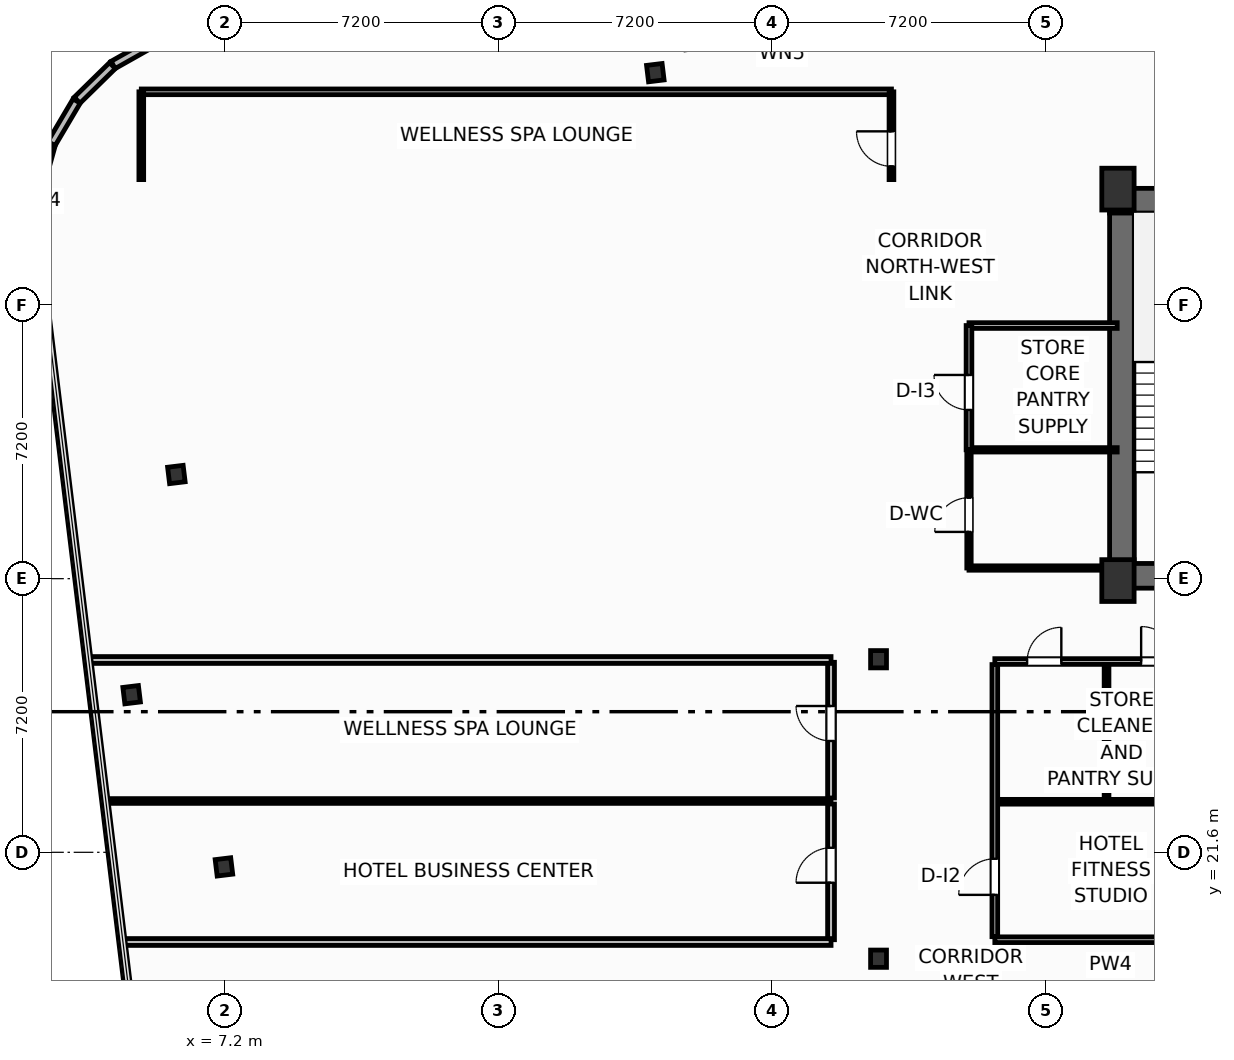
"""IFC4 building model, lengths in metres.
Left out: names, types, materials, properties, quantities, classifications, styles, units other than length and angle.
Written with IfcOpenShell. Run it as: python <this file> out.ifc"""

import sys

from ifc_helpers import new_model, si_unit, direction, frame, frame_2d, origin, origin_2d, place, context, subcontext, project, spatial, rectangle, i_section, extrude, element, fill, save


model = new_model("IFC4")
c1 = context("Model", 3, precision=1e-05, world=origin(), true_north=direction((0.0, 1.0)))
c2 = subcontext(c1, "Body", "Model", "MODEL_VIEW")
j1 = project(units=[si_unit("LENGTHUNIT", "METRE"), si_unit("PLANEANGLEUNIT", "RADIAN")], contexts=[c1])
p1 = place(None, origin())
s1 = spatial("IfcSite", under=j1, at=p1, CompositionType="ELEMENT")
p2 = place(p1, origin())
s2 = spatial("IfcBuilding", under=s1, at=p2, CompositionType="ELEMENT")
p3 = place(p2, frame((0.0, 0.0, 204.2)))
s3 = spatial("IfcBuildingStorey", under=s2, at=p3, CompositionType="ELEMENT", Elevation=204.2)
for number, where, z_axis, x_axis in (
    (1, (30.7, 28.75, 0.0), (0.0, 0.0, 1.0), (1.0, 0.0, 0.0)),
    (2, (30.7, 39.05, 0.0), (0.0, 0.0, 1.0), (1.0, 0.0, 0.0)),
):
    element("IfcColumn", number, at=place(p3, frame(where, z_axis=z_axis, x_axis=x_axis)), inside=s3, PredefinedType="COLUMN", context=c2, shape_type="SweptSolid", body=[
        extrude(rectangle(XDim=0.85, YDim=1.1, at=origin_2d()), origin(), (0.0, 0.0, 1.0), 3.7),
    ])
for number, where, z_axis, x_axis in (
    (3, (24.4, 18.8, 0.0), (0.0, 0.0, 1.0), (1.0, 0.0, 0.0)),
    (4, (24.4, 26.68, 0.0), (0.0, 0.0, 1.0), (1.0, 0.0, 0.0)),
):
    element("IfcColumn", number, at=place(p3, frame(where, z_axis=z_axis, x_axis=x_axis)), inside=s3, PredefinedType="COLUMN", context=c2, shape_type="SweptSolid", body=[
        extrude(i_section(OverallWidth=0.418, OverallDepth=0.455, WebThickness=0.042, FlangeThickness=0.068, FilletRadius=0.025, at=origin_2d()), origin(), (0.0, 0.0, 1.0), 3.7),
    ])
p4 = place(p3, frame((30.48, 38.745, 0.0), z_axis=(0.0, 0.0, 1.0), x_axis=(1.0, 0.0, 0.0)))
e5 = element("IfcWall", 5, at=p4, inside=s3, PredefinedType="SHEAR", context=c2, shape_type="SweptSolid", body=[
    extrude(rectangle(XDim=17.44, YDim=0.65, at=frame_2d((8.72, 0.0))), origin(), (0.0, 0.0, 1.0), 3.38),
])
p5 = place(p3, frame((30.805, 29.2, 0.0), z_axis=(0.0, 0.0, 1.0), x_axis=(0.0, 1.0, 0.0)))
e6 = element("IfcWall", 6, at=p5, inside=s3, PredefinedType="SHEAR", context=c2, shape_type="SweptSolid", body=[
    extrude(rectangle(XDim=9.22, YDim=0.65, at=frame_2d((4.61, 0.0))), origin(), (0.0, 0.0, 1.0), 3.38),
])
p6 = place(p3, frame((30.48, 28.875, 0.0), z_axis=(0.0, 0.0, 1.0), x_axis=(1.0, 0.0, 0.0)))
e7 = element("IfcWall", 7, at=p6, inside=s3, PredefinedType="SHEAR", context=c2, shape_type="SweptSolid", body=[
    extrude(rectangle(XDim=4.32, YDim=0.65, at=frame_2d((2.16, 0.0))), origin(), (0.0, 0.0, 1.0), 3.38),
])
for number, where, z_axis, x_axis in (
    (8, (18.526, 42.114, 0.0), (0.0, 0.0, 1.0), (0.993, 0.12, 0.0)),
    (9, (5.923, 31.541, 0.0), (0.0, 0.0, 1.0), (0.993, 0.12, 0.0)),
    (10, (4.746, 25.747, 0.0), (0.0, 0.0, 1.0), (0.993, 0.12, 0.0)),
    (11, (7.175, 21.216, 0.0), (0.0, 0.0, 1.0), (0.993, 0.12, 0.0)),
):
    element("IfcColumn", number, at=place(p3, frame(where, z_axis=z_axis, x_axis=x_axis)), inside=s3, PredefinedType="COLUMN", context=c2, shape_type="SweptSolid", body=[
        extrude(i_section(OverallWidth=0.412, OverallDepth=0.435, WebThickness=0.036, FlangeThickness=0.057, FilletRadius=0.025, at=origin_2d()), origin(), (0.0, 0.0, 1.0), 3.7),
    ])
for number, where, z_axis, x_axis in (
    (12, (5.392, 42.956, 0.0), (0.0, 0.0, 1.0), (-0.871, -0.491, 0.0)),
    (13, (4.241, 42.3, 0.0), (0.0, 0.0, 1.0), (-0.714, -0.7, 0.0)),
):
    element("IfcWall", number, at=place(p3, frame(where, z_axis=z_axis, x_axis=x_axis)), inside=s3, PredefinedType="SOLIDWALL", context=c2, shape_type="SweptSolid", body=[
        extrude(rectangle(XDim=1.301, YDim=0.22, at=frame_2d((0.65, 0.0))), origin(), (0.0, 0.0, 1.0), 2.66),
    ])
p7 = place(p3, frame((3.299, 41.368, 0.0), z_axis=(0.0, 0.0, 1.0), x_axis=(-0.508716668029, -0.860933999601, 0.0)))
e14 = element("IfcWall", 14, at=p7, inside=s3, PredefinedType="SOLIDWALL", context=c2, shape_type="SweptSolid", body=[
    extrude(rectangle(XDim=1.301, YDim=0.22, at=frame_2d((0.65, 0.0))), origin(), (0.0, 0.0, 1.0), 2.66),
])
p8 = place(p3, frame((2.63, 40.224, 0.0), z_axis=(0.0, 0.0, 1.0), x_axis=(-0.26876657226, -0.963205341366, 0.0)))
e15 = element("IfcWall", 15, at=p8, inside=s3, PredefinedType="SOLIDWALL", context=c2, shape_type="SweptSolid", body=[
    extrude(rectangle(XDim=1.301, YDim=0.22, at=frame_2d((0.65, 0.0))), origin(), (0.0, 0.0, 1.0), 2.66),
])
p9 = place(p3, frame((5.0, 41.61, 0.0), z_axis=(0.0, 0.0, 1.0), x_axis=(1.0, 0.0, 0.0)))
e16 = element("IfcWall", 16, at=p9, inside=s3, PredefinedType="PARTITIONING", context=c2, shape_type="SweptSolid", body=[
    extrude(rectangle(XDim=19.74, YDim=0.15, at=frame_2d((9.87, 0.0))), origin(), (0.0, 0.0, 1.0), 3.38),
])
p10 = place(p3, frame((5.0, 39.3, 0.0), z_axis=(0.0, 0.0, 1.0), x_axis=(0.0, 1.0, 0.0)))
e17 = element("IfcWall", 17, at=p10, inside=s3, PredefinedType="PARTITIONING", context=c2, shape_type="SweptSolid", body=[
    extrude(rectangle(XDim=2.31, YDim=0.125, at=frame_2d((1.155, 0.0))), origin(), (0.0, 0.0, 1.0), 3.38),
])
p11 = place(p3, frame((24.74, 39.3, 0.0), z_axis=(0.0, 0.0, 1.0), x_axis=(0.0, 1.0, 0.0)))
e18 = element("IfcWall", 18, at=p11, inside=s3, PredefinedType="PARTITIONING", context=c2, shape_type="SweptSolid", body=[
    extrude(rectangle(XDim=2.31, YDim=0.125, at=frame_2d((1.155, 0.0))), origin(), (0.0, 0.0, 1.0), 3.38),
])
p12 = place(p11, frame((0.35, 0.0, 0.0)))
e19 = element("IfcOpeningElement", 19, at=p12, cuts=e18, PredefinedType="OPENING", context=c2, shape_type="SweptSolid", body=[
    extrude(rectangle(XDim=0.92, YDim=2.05, at=frame_2d((0.46, 1.025))), frame((0.0, 0.073, 0.0), z_axis=(0.0, -1.0, 0.0), x_axis=(1.0, 0.0, 0.0)), (0.0, 0.0, 1.0), 0.145),
])
p13 = place(p3, frame((23.15, 19.3, 0.0), z_axis=(0.0, 0.0, 1.0), x_axis=(0.0, 1.0, 0.0)))
e20 = element("IfcWall", 20, at=p13, inside=s3, PredefinedType="PARTITIONING", context=c2, shape_type="SweptSolid", body=[
    extrude(rectangle(XDim=3.57, YDim=0.18, at=frame_2d((1.785, 0.0))), origin(), (0.0, 0.0, 1.0), 3.38),
])
p14 = place(p13, frame((1.5, 0.0, 0.0)))
e21 = element("IfcOpeningElement", 21, at=p14, cuts=e20, PredefinedType="OPENING", context=c2, shape_type="SweptSolid", body=[
    extrude(rectangle(XDim=0.92, YDim=2.05, at=frame_2d((0.46, 1.025))), frame((0.0, 0.1, 0.0), z_axis=(0.0, -1.0, 0.0), x_axis=(1.0, 0.0, 0.0)), (0.0, 0.0, 1.0), 0.2),
])
p15 = place(p3, frame((23.15, 23.03, 0.0), z_axis=(0.0, 0.0, 1.0), x_axis=(0.0, 1.0, 0.0)))
e22 = element("IfcWall", 22, at=p15, inside=s3, PredefinedType="PARTITIONING", context=c2, shape_type="SweptSolid", body=[
    extrude(rectangle(XDim=3.57, YDim=0.18, at=frame_2d((1.785, 0.0))), origin(), (0.0, 0.0, 1.0), 3.38),
])
p16 = place(p15, frame((1.5, 0.0, 0.0)))
e23 = element("IfcOpeningElement", 23, at=p16, cuts=e22, PredefinedType="OPENING", context=c2, shape_type="SweptSolid", body=[
    extrude(rectangle(XDim=0.92, YDim=2.05, at=frame_2d((0.46, 1.025))), frame((0.0, 0.1, 0.0), z_axis=(0.0, -1.0, 0.0), x_axis=(1.0, 0.0, 0.0)), (0.0, 0.0, 1.0), 0.2),
])
p17 = place(p3, frame((4.107, 22.95, 0.0), z_axis=(0.0, 0.0, 1.0), x_axis=(1.0, 0.0, 0.0)))
e24 = element("IfcWall", 24, at=p17, inside=s3, PredefinedType="PARTITIONING", context=c2, shape_type="SweptSolid", body=[
    extrude(rectangle(XDim=19.042, YDim=0.125, at=frame_2d((9.521, 0.0))), origin(), (0.0, 0.0, 1.0), 1.165),
])
p18 = place(p3, frame((4.557, 19.24, 0.0), z_axis=(0.0, 0.0, 1.0), x_axis=(1.0, 0.0, 0.0)))
e25 = element("IfcWall", 25, at=p18, inside=s3, PredefinedType="PARTITIONING", context=c2, shape_type="SweptSolid", body=[
    extrude(rectangle(XDim=18.593, YDim=0.18, at=frame_2d((9.296, 0.0))), origin(), (0.0, 0.0, 1.0), 3.38),
])
p19 = place(p3, frame((3.658, 26.66, 0.0), z_axis=(0.0, 0.0, 1.0), x_axis=(1.0, 0.0, 0.0)))
e26 = element("IfcWall", 26, at=p19, inside=s3, PredefinedType="PARTITIONING", context=c2, shape_type="SweptSolid", body=[
    extrude(rectangle(XDim=19.492, YDim=0.18, at=frame_2d((9.746, 0.0))), origin(), (0.0, 0.0, 1.0), 1.165),
])
p20 = place(p3, frame((27.46, 19.3, 0.0), z_axis=(0.0, 0.0, 1.0), x_axis=(1.0, 0.0, 0.0)))
e27 = element("IfcWall", 27, at=p20, inside=s3, PredefinedType="PARTITIONING", context=c2, shape_type="SweptSolid", body=[
    extrude(rectangle(XDim=6.1, YDim=0.15, at=frame_2d((3.05, 0.0))), origin(), (0.0, 0.0, 1.0), 2.592),
])
p21 = place(p3, frame((27.46, 26.62, 0.0), z_axis=(0.0, 0.0, 1.0), x_axis=(1.0, 0.0, 0.0)))
e28 = element("IfcWall", 28, at=p21, inside=s3, PredefinedType="PARTITIONING", context=c2, shape_type="SweptSolid", body=[
    extrude(rectangle(XDim=6.1, YDim=0.15, at=frame_2d((3.05, 0.0))), origin(), (0.0, 0.0, 1.0), 2.592),
])
p22 = place(p21, frame((0.85, 0.0, 0.0)))
e29 = element("IfcOpeningElement", 29, at=p22, cuts=e28, PredefinedType="OPENING", context=c2, shape_type="SweptSolid", body=[
    extrude(rectangle(XDim=0.9, YDim=2.05, at=frame_2d((0.45, 1.025))), frame((0.0, 0.085, 0.0), z_axis=(0.0, -1.0, 0.0), x_axis=(1.0, 0.0, 0.0)), (0.0, 0.0, 1.0), 0.17),
])
p23 = place(p21, frame((3.85, 0.0, 0.0)))
e30 = element("IfcOpeningElement", 30, at=p23, cuts=e28, PredefinedType="OPENING", context=c2, shape_type="SweptSolid", body=[
    extrude(rectangle(XDim=0.92, YDim=2.05, at=frame_2d((0.46, 1.025))), frame((0.0, 0.085, 0.0), z_axis=(0.0, -1.0, 0.0), x_axis=(1.0, 0.0, 0.0)), (0.0, 0.0, 1.0), 0.17),
])
p24 = place(p3, frame((27.52, 22.93, 0.0), z_axis=(0.0, 0.0, 1.0), x_axis=(1.0, 0.0, 0.0)))
e31 = element("IfcWall", 31, at=p24, inside=s3, PredefinedType="PARTITIONING", context=c2, shape_type="SweptSolid", body=[
    extrude(rectangle(XDim=6.0, YDim=0.125, at=frame_2d((3.0, 0.0))), origin(), (0.0, 0.0, 1.0), 3.38),
])
p25 = place(p3, frame((30.4, 23.0, 0.0), z_axis=(0.0, 0.0, 1.0), x_axis=(0.0, 1.0, 0.0)))
e32 = element("IfcWall", 32, at=p25, inside=s3, PredefinedType="PARTITIONING", context=c2, shape_type="SweptSolid", body=[
    extrude(rectangle(XDim=3.54, YDim=0.125, at=frame_2d((1.77, 0.0))), origin(), (0.0, 0.0, 1.0), 3.38),
])
p26 = place(p3, frame((27.46, 19.38, 0.0), z_axis=(0.0, 0.0, 1.0), x_axis=(0.0, 1.0, 0.0)))
e33 = element("IfcWall", 33, at=p26, inside=s3, PredefinedType="PARTITIONING", context=c2, shape_type="SweptSolid", body=[
    extrude(rectangle(XDim=7.16, YDim=0.15, at=frame_2d((3.58, 0.0))), origin(), (0.0, 0.0, 1.0), 3.38),
])
p27 = place(p26, frame((1.1, 0.0, 0.0)))
e34 = element("IfcOpeningElement", 34, at=p27, cuts=e33, PredefinedType="OPENING", context=c2, shape_type="SweptSolid", body=[
    extrude(rectangle(XDim=0.95, YDim=2.05, at=frame_2d((0.475, 1.025))), frame((0.0, 0.085, 0.0), z_axis=(0.0, -1.0, 0.0), x_axis=(1.0, 0.0, 0.0)), (0.0, 0.0, 1.0), 0.17),
])
p28 = place(p3, frame((26.8, 32.19, 0.0), z_axis=(0.0, 0.0, 1.0), x_axis=(1.0, 0.0, 0.0)))
e35 = element("IfcWall", 35, at=p28, inside=s3, PredefinedType="PARTITIONING", context=c2, shape_type="SweptSolid", body=[
    extrude(rectangle(XDim=3.88, YDim=0.115, at=frame_2d((1.94, 0.0))), origin(), (0.0, 0.0, 1.0), 3.38),
])
p29 = place(p3, frame((26.78, 29.08, 0.0), z_axis=(0.0, 0.0, 1.0), x_axis=(1.0, 0.0, 0.0)))
e36 = element("IfcWall", 36, at=p29, inside=s3, PredefinedType="PARTITIONING", context=c2, shape_type="SweptSolid", body=[
    extrude(rectangle(XDim=3.7, YDim=0.115, at=frame_2d((1.85, 0.0))), origin(), (0.0, 0.0, 1.0), 3.38),
])
p30 = place(p3, frame((26.78, 35.46, 0.0), z_axis=(0.0, 0.0, 1.0), x_axis=(1.0, 0.0, 0.0)))
e37 = element("IfcWall", 37, at=p30, inside=s3, PredefinedType="PARTITIONING", context=c2, shape_type="SweptSolid", body=[
    extrude(rectangle(XDim=3.9, YDim=0.15, at=frame_2d((1.95, 0.0))), origin(), (0.0, 0.0, 1.0), 3.38),
])
p31 = place(p3, frame((26.78, 29.08, 0.0), z_axis=(0.0, 0.0, 1.0), x_axis=(0.0, 1.0, 0.0)))
e38 = element("IfcWall", 38, at=p31, inside=s3, PredefinedType="PARTITIONING", context=c2, shape_type="SweptSolid", body=[
    extrude(rectangle(XDim=3.11, YDim=0.115, at=frame_2d((1.555, 0.0))), origin(), (0.0, 0.0, 1.0), 3.38),
])
p32 = place(p31, frame((0.95, 0.0, 0.0)))
e39 = element("IfcOpeningElement", 39, at=p32, cuts=e38, PredefinedType="OPENING", context=c2, shape_type="SweptSolid", body=[
    extrude(rectangle(XDim=0.9, YDim=2.05, at=frame_2d((0.45, 1.025))), frame((0.0, 0.067, 0.0), z_axis=(0.0, -1.0, 0.0), x_axis=(1.0, 0.0, 0.0)), (0.0, 0.0, 1.0), 0.135),
])
p33 = place(p3, frame((26.78, 32.19, 0.0), z_axis=(0.0, 0.0, 1.0), x_axis=(0.0, 1.0, 0.0)))
e40 = element("IfcWall", 40, at=p33, inside=s3, PredefinedType="PARTITIONING", context=c2, shape_type="SweptSolid", body=[
    extrude(rectangle(XDim=3.27, YDim=0.15, at=frame_2d((1.635, 0.0))), origin(), (0.0, 0.0, 1.0), 3.38),
])
p34 = place(p33, frame((1.05, 0.0, 0.0)))
e41 = element("IfcOpeningElement", 41, at=p34, cuts=e40, PredefinedType="OPENING", context=c2, shape_type="SweptSolid", body=[
    extrude(rectangle(XDim=0.92, YDim=2.05, at=frame_2d((0.46, 1.025))), frame((0.0, 0.085, 0.0), z_axis=(0.0, -1.0, 0.0), x_axis=(1.0, 0.0, 0.0)), (0.0, 0.0, 1.0), 0.17),
])
p35 = place(p12, origin())
e42 = element("IfcDoor", 42, at=p35, inside=s3, OperationType="SINGLE_SWING_RIGHT", PredefinedType="DOOR", context=c2, shape_type="SweptSolid", body=[
    extrude(rectangle(XDim=0.92, YDim=2.05, at=frame_2d((0.46, 1.025))), frame((0.0, 0.025, 0.0), z_axis=(0.0, -1.0, 0.0), x_axis=(1.0, 0.0, 0.0)), (0.0, 0.0, 1.0), 0.05),
])
fill(e19, e42)
p36 = place(p14, origin())
e43 = element("IfcDoor", 43, at=p36, inside=s3, OperationType="SINGLE_SWING_LEFT", PredefinedType="DOOR", context=c2, shape_type="SweptSolid", body=[
    extrude(rectangle(XDim=0.92, YDim=2.05, at=frame_2d((0.46, 1.025))), frame((0.0, 0.025, 0.0), z_axis=(0.0, -1.0, 0.0), x_axis=(1.0, 0.0, 0.0)), (0.0, 0.0, 1.0), 0.05),
])
fill(e21, e43)
p37 = place(p16, origin())
e44 = element("IfcDoor", 44, at=p37, inside=s3, OperationType="SINGLE_SWING_RIGHT", PredefinedType="DOOR", context=c2, shape_type="SweptSolid", body=[
    extrude(rectangle(XDim=0.92, YDim=2.05, at=frame_2d((0.46, 1.025))), frame((0.0, 0.025, 0.0), z_axis=(0.0, -1.0, 0.0), x_axis=(1.0, 0.0, 0.0)), (0.0, 0.0, 1.0), 0.05),
])
fill(e23, e44)
p38 = place(p22, origin())
e45 = element("IfcDoor", 45, at=p38, inside=s3, OperationType="SINGLE_SWING_RIGHT", PredefinedType="DOOR", context=c2, shape_type="SweptSolid", body=[
    extrude(rectangle(XDim=0.9, YDim=2.05, at=frame_2d((0.45, 1.025))), frame((0.0, 0.025, 0.0), z_axis=(0.0, -1.0, 0.0), x_axis=(1.0, 0.0, 0.0)), (0.0, 0.0, 1.0), 0.05),
])
fill(e29, e45)
p39 = place(p23, origin())
e46 = element("IfcDoor", 46, at=p39, inside=s3, OperationType="SINGLE_SWING_LEFT", PredefinedType="DOOR", context=c2, shape_type="SweptSolid", body=[
    extrude(rectangle(XDim=0.92, YDim=2.05, at=frame_2d((0.46, 1.025))), frame((0.0, 0.025, 0.0), z_axis=(0.0, -1.0, 0.0), x_axis=(1.0, 0.0, 0.0)), (0.0, 0.0, 1.0), 0.05),
])
fill(e30, e46)
p40 = place(p27, origin())
e47 = element("IfcDoor", 47, at=p40, inside=s3, OperationType="SINGLE_SWING_LEFT", PredefinedType="DOOR", context=c2, shape_type="SweptSolid", body=[
    extrude(rectangle(XDim=0.95, YDim=2.05, at=frame_2d((0.475, 1.025))), frame((0.0, 0.025, 0.0), z_axis=(0.0, -1.0, 0.0), x_axis=(1.0, 0.0, 0.0)), (0.0, 0.0, 1.0), 0.05),
])
fill(e34, e47)
p41 = place(p32, origin())
e48 = element("IfcDoor", 48, at=p41, inside=s3, OperationType="SINGLE_SWING_LEFT", PredefinedType="DOOR", context=c2, shape_type="SweptSolid", body=[
    extrude(rectangle(XDim=0.9, YDim=2.05, at=frame_2d((0.45, 1.025))), frame((0.0, 0.025, 0.0), z_axis=(0.0, -1.0, 0.0), x_axis=(1.0, 0.0, 0.0)), (0.0, 0.0, 1.0), 0.05),
])
fill(e39, e48)
p42 = place(p34, origin())
e49 = element("IfcDoor", 49, at=p42, inside=s3, OperationType="SINGLE_SWING_RIGHT", PredefinedType="DOOR", context=c2, shape_type="SweptSolid", body=[
    extrude(rectangle(XDim=0.92, YDim=2.05, at=frame_2d((0.46, 1.025))), frame((0.0, 0.025, 0.0), z_axis=(0.0, -1.0, 0.0), x_axis=(1.0, 0.0, 0.0)), (0.0, 0.0, 1.0), 0.05),
])
fill(e41, e49)
save(model, sys.argv[1])
